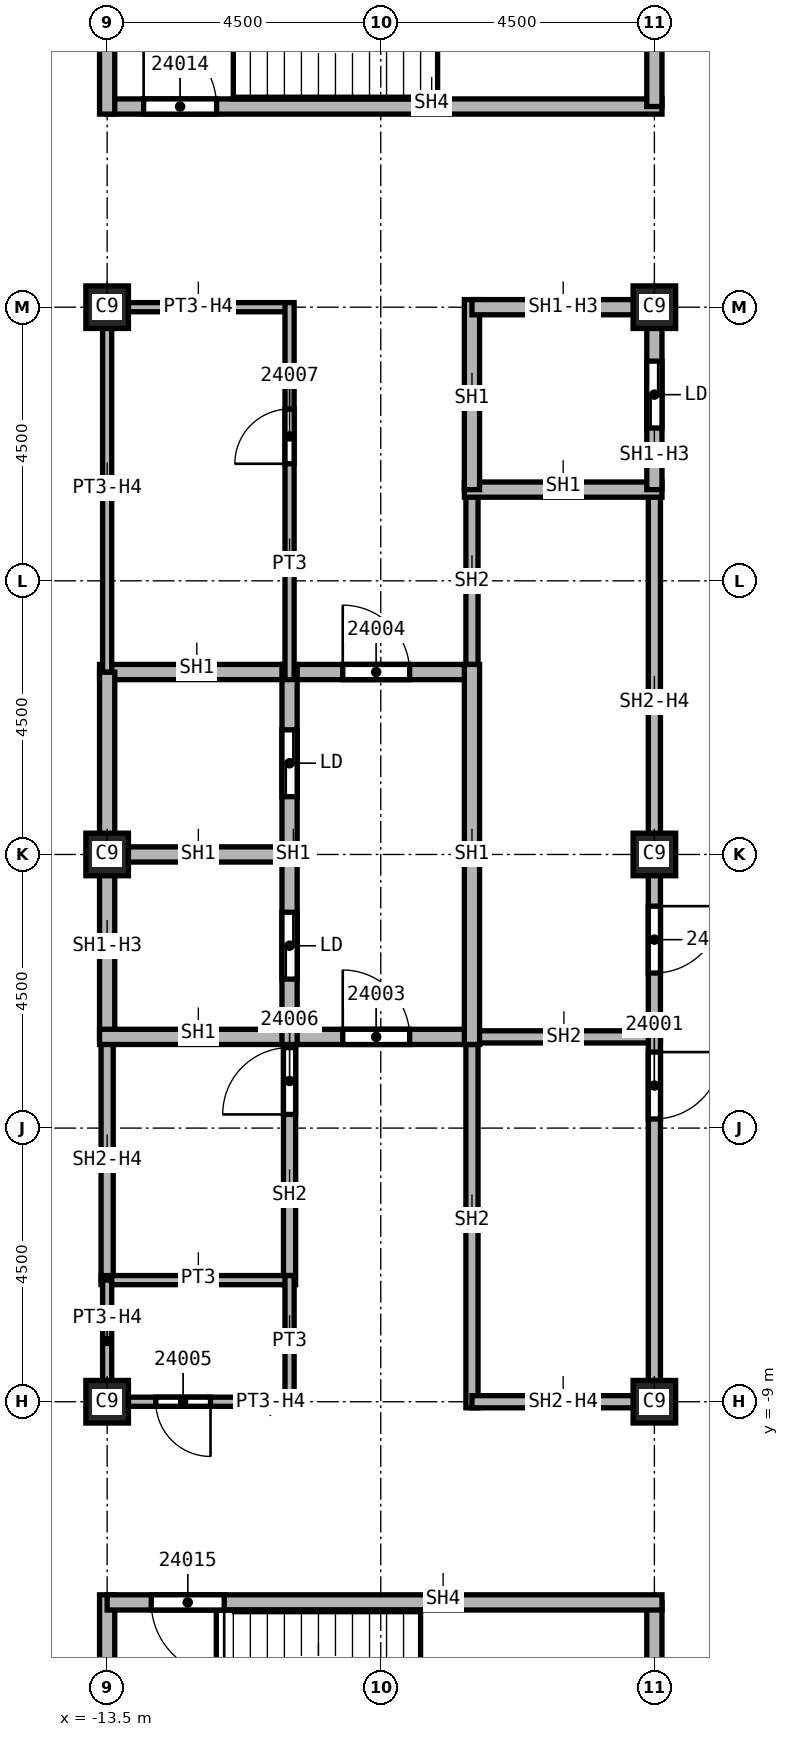
"""IFC4 building model, lengths in metres.
Left out: names, types, materials, properties, quantities, classifications, styles, units other than length and angle.
Written with IfcOpenShell. Run it as: python <this file> out.ifc"""

import sys

from ifc_helpers import new_model, si_unit, direction, frame, frame_2d, origin, origin_2d, place, context, subcontext, project, spatial, rectangle, extrude, element, fill, save


model = new_model("IFC4")
c1 = context("Model", 3, precision=1e-05, world=origin(), true_north=direction((0.0, 1.0)))
c2 = subcontext(c1, "Body", "Model", "MODEL_VIEW")
j1 = project(units=[si_unit("LENGTHUNIT", "METRE"), si_unit("PLANEANGLEUNIT", "RADIAN")], contexts=[c1])
p1 = place(None, origin())
s1 = spatial("IfcSite", under=j1, at=p1, CompositionType="ELEMENT")
p2 = place(p1, origin())
s2 = spatial("IfcBuilding", under=s1, at=p2, CompositionType="ELEMENT")
p3 = place(p2, frame((0.0, 0.0, 338.0)))
s3 = spatial("IfcBuildingStorey", under=s2, at=p3, CompositionType="ELEMENT", Elevation=338.0)
for number, where, z_axis, x_axis in (
    (1, (-4.5, 0.0, 0.0), (0.0, 0.0, 1.0), (1.0, 0.0, 0.0)),
    (2, (-4.5, 9.0, 0.0), (0.0, 0.0, 1.0), (1.0, 0.0, 0.0)),
    (3, (-4.5, -9.0, 0.0), (0.0, 0.0, 1.0), (1.0, 0.0, 0.0)),
    (4, (-13.5, 0.0, 0.0), (0.0, 0.0, 1.0), (1.0, 0.0, 0.0)),
    (5, (-13.5, 9.0, 0.0), (0.0, 0.0, 1.0), (1.0, 0.0, 0.0)),
    (6, (-13.5, -9.0, 0.0), (0.0, 0.0, 1.0), (1.0, 0.0, 0.0)),
):
    element("IfcColumn", number, at=place(p3, frame(where, z_axis=z_axis, x_axis=x_axis)), inside=s3, PredefinedType="COLUMN", context=c2, shape_type="SweptSolid", body=[
        extrude(rectangle(XDim=0.7, YDim=0.7, at=origin_2d()), origin(), (0.0, 0.0, 1.0), 3.74),
    ])
p4 = place(p3, frame((-13.5, -7.0, 0.0), z_axis=(0.0, 0.0, 1.0), x_axis=(0.0, 1.0, 0.0)))
e7 = element("IfcWall", 7, at=p4, inside=s3, PredefinedType="SOLIDWALL", context=c2, shape_type="SweptSolid", body=[
    extrude(rectangle(XDim=4.0, YDim=0.2, at=frame_2d((2.0, 0.0))), origin(), (0.0, 0.0, 1.0), 3.062),
])
p5 = place(p3, frame((-10.5, -7.075, 0.0), z_axis=(0.0, 0.0, 1.0), x_axis=(0.0, 1.0, 0.0)))
e8 = element("IfcWall", 8, at=p5, inside=s3, PredefinedType="SOLIDWALL", context=c2, shape_type="SweptSolid", body=[
    extrude(rectangle(XDim=4.2, YDim=0.2, at=frame_2d((2.1, 0.0))), origin(), (0.0, 0.0, 1.0), 3.74),
])
p6 = place(p5, frame((2.8, 0.0, 0.0)))
e9 = element("IfcOpeningElement", 9, at=p6, cuts=e8, PredefinedType="OPENING", context=c2, shape_type="SweptSolid", body=[
    extrude(rectangle(XDim=1.1, YDim=2.1, at=frame_2d((0.55, 1.05))), frame((0.0, 0.1, 0.0), z_axis=(0.0, -1.0, 0.0), x_axis=(1.0, 0.0, 0.0)), (0.0, 0.0, 1.0), 0.2),
])
p7 = place(p3, frame((-7.625, -3.0, 0.0), z_axis=(0.0, 0.0, 1.0), x_axis=(1.0, 0.0, 0.0)))
e10 = element("IfcWall", 10, at=p7, inside=s3, PredefinedType="SOLIDWALL", context=c2, shape_type="SweptSolid", body=[
    extrude(rectangle(XDim=3.225, YDim=0.2, at=frame_2d((1.613, 0.0))), origin(), (0.0, 0.0, 1.0), 3.74),
])
p8 = place(p3, frame((-7.5, -9.1, 0.0), z_axis=(0.0, 0.0, 1.0), x_axis=(0.0, 1.0, 0.0)))
e11 = element("IfcWall", 11, at=p8, inside=s3, PredefinedType="SOLIDWALL", context=c2, shape_type="SweptSolid", body=[
    extrude(rectangle(XDim=6.225, YDim=0.2, at=frame_2d((3.113, 0.0))), origin(), (0.0, 0.0, 1.0), 3.74),
])
p9 = place(p3, frame((-7.5, 2.875, 0.0), z_axis=(0.0, 0.0, 1.0), x_axis=(0.0, 1.0, 0.0)))
e12 = element("IfcWall", 12, at=p9, inside=s3, PredefinedType="SOLIDWALL", context=c2, shape_type="SweptSolid", body=[
    extrude(rectangle(XDim=3.125, YDim=0.2, at=frame_2d((1.562, 0.0))), origin(), (0.0, 0.0, 1.0), 3.74),
])
p10 = place(p3, frame((-4.5, -9.0, 0.0), z_axis=(0.0, 0.0, 1.0), x_axis=(-1.0, 0.0, 0.0)))
e13 = element("IfcWall", 13, at=p10, inside=s3, PredefinedType="SOLIDWALL", context=c2, shape_type="SweptSolid", body=[
    extrude(rectangle(XDim=3.0, YDim=0.2, at=frame_2d((1.5, 0.0))), origin(), (0.0, 0.0, 1.0), 3.062),
])
p11 = place(p3, frame((-4.5, 6.0, 0.0), z_axis=(0.0, 0.0, 1.0), x_axis=(0.0, -1.0, 0.0)))
e14 = element("IfcWall", 14, at=p11, inside=s3, PredefinedType="SOLIDWALL", context=c2, shape_type="SweptSolid", body=[
    extrude(rectangle(XDim=15.1, YDim=0.2, at=frame_2d((7.55, 0.0))), origin(), (0.0, 0.0, 1.0), 3.062),
])
p12 = place(p11, frame((9.25, 0.0, 0.0)))
e15 = element("IfcOpeningElement", 15, at=p12, cuts=e14, PredefinedType="OPENING", context=c2, shape_type="SweptSolid", body=[
    extrude(rectangle(XDim=1.1, YDim=2.1, at=frame_2d((0.55, 1.05))), frame((0.0, 0.1, 0.0), z_axis=(0.0, -1.0, 0.0), x_axis=(1.0, 0.0, 0.0)), (0.0, 0.0, 1.0), 0.2),
])
p13 = place(p11, frame((6.85, 0.0, 0.0)))
e16 = element("IfcOpeningElement", 16, at=p13, cuts=e14, PredefinedType="OPENING", context=c2, shape_type="SweptSolid", body=[
    extrude(rectangle(XDim=1.1, YDim=2.1, at=frame_2d((0.55, 1.05))), frame((0.0, 0.1, 0.0), z_axis=(0.0, -1.0, 0.0), x_axis=(1.0, 0.0, 0.0)), (0.0, 0.0, 1.0), 0.2),
])
p14 = place(p3, frame((-13.625, 0.0, 0.0), z_axis=(0.0, 0.0, 1.0), x_axis=(1.0, 0.0, 0.0)))
e17 = element("IfcWall", 17, at=p14, inside=s3, PredefinedType="SOLIDWALL", context=c2, shape_type="SweptSolid", body=[
    extrude(rectangle(XDim=3.125, YDim=0.25, at=frame_2d((1.562, 0.0))), origin(), (0.0, 0.0, 1.0), 3.74),
])
p15 = place(p3, frame((-13.625, 3.0, 0.0), z_axis=(0.0, 0.0, 1.0), x_axis=(1.0, 0.0, 0.0)))
e18 = element("IfcWall", 18, at=p15, inside=s3, PredefinedType="SOLIDWALL", context=c2, shape_type="SweptSolid", body=[
    extrude(rectangle(XDim=6.125, YDim=0.25, at=frame_2d((3.062, 0.0))), origin(), (0.0, 0.0, 1.0), 3.74),
])
p16 = place(p15, frame((4.0, 0.0, 0.0)))
e19 = element("IfcOpeningElement", 19, at=p16, cuts=e18, PredefinedType="OPENING", context=c2, shape_type="SweptSolid", body=[
    extrude(rectangle(XDim=1.1, YDim=2.1, at=frame_2d((0.55, 1.05))), frame((0.0, 0.125, 0.0), z_axis=(0.0, -1.0, 0.0), x_axis=(1.0, 0.0, 0.0)), (0.0, 0.0, 1.0), 0.25),
])
p17 = place(p3, frame((-13.5, -3.0, 0.0), z_axis=(0.0, 0.0, 1.0), x_axis=(0.0, 1.0, 0.0)))
e20 = element("IfcWall", 20, at=p17, inside=s3, PredefinedType="SOLIDWALL", context=c2, shape_type="SweptSolid", body=[
    extrude(rectangle(XDim=6.0, YDim=0.25, at=frame_2d((3.0, 0.0))), origin(), (0.0, 0.0, 1.0), 3.062),
])
p18 = place(p3, frame((-13.625, -3.0, 0.0), z_axis=(0.0, 0.0, 1.0), x_axis=(1.0, 0.0, 0.0)))
e21 = element("IfcWall", 21, at=p18, inside=s3, PredefinedType="SOLIDWALL", context=c2, shape_type="SweptSolid", body=[
    extrude(rectangle(XDim=6.125, YDim=0.25, at=frame_2d((3.062, 0.0))), origin(), (0.0, 0.0, 1.0), 3.74),
])
p19 = place(p18, frame((4.0, 0.0, 0.0)))
e22 = element("IfcOpeningElement", 22, at=p19, cuts=e21, PredefinedType="OPENING", context=c2, shape_type="SweptSolid", body=[
    extrude(rectangle(XDim=1.1, YDim=2.1, at=frame_2d((0.55, 1.05))), frame((0.0, 0.125, 0.0), z_axis=(0.0, -1.0, 0.0), x_axis=(1.0, 0.0, 0.0)), (0.0, 0.0, 1.0), 0.25),
])
p20 = place(p3, frame((-10.5, -3.125, 0.0), z_axis=(0.0, 0.0, 1.0), x_axis=(0.0, 1.0, 0.0)))
e23 = element("IfcWall", 23, at=p20, inside=s3, PredefinedType="SOLIDWALL", context=c2, shape_type="SweptSolid", body=[
    extrude(rectangle(XDim=6.25, YDim=0.25, at=frame_2d((3.125, 0.0))), origin(), (0.0, 0.0, 1.0), 3.74),
])
p21 = place(p20, frame((1.075, 0.0, 0.0)))
e24 = element("IfcOpeningElement", 24, at=p21, cuts=e23, PredefinedType="OPENING", context=c2, shape_type="SweptSolid", body=[
    extrude(rectangle(XDim=1.1, YDim=2.1, at=frame_2d((0.55, 1.05))), frame((0.0, 0.125, 0.0), z_axis=(0.0, -1.0, 0.0), x_axis=(1.0, 0.0, 0.0)), (0.0, 0.0, 1.0), 0.25),
])
p22 = place(p20, frame((4.075, 0.0, 0.0)))
e25 = element("IfcOpeningElement", 25, at=p22, cuts=e23, PredefinedType="OPENING", context=c2, shape_type="SweptSolid", body=[
    extrude(rectangle(XDim=1.1, YDim=2.1, at=frame_2d((0.55, 1.05))), frame((0.0, 0.125, 0.0), z_axis=(0.0, -1.0, 0.0), x_axis=(1.0, 0.0, 0.0)), (0.0, 0.0, 1.0), 0.25),
])
p23 = place(p3, frame((-7.625, 6.0, 0.0), z_axis=(0.0, 0.0, 1.0), x_axis=(1.0, 0.0, 0.0)))
e26 = element("IfcWall", 26, at=p23, inside=s3, PredefinedType="SOLIDWALL", context=c2, shape_type="SweptSolid", body=[
    extrude(rectangle(XDim=3.25, YDim=0.25, at=frame_2d((1.625, 0.0))), origin(), (0.0, 0.0, 1.0), 3.74),
])
p24 = place(p3, frame((-7.5, -3.125, 0.0), z_axis=(0.0, 0.0, 1.0), x_axis=(0.0, 1.0, 0.0)))
e27 = element("IfcWall", 27, at=p24, inside=s3, PredefinedType="SOLIDWALL", context=c2, shape_type="SweptSolid", body=[
    extrude(rectangle(XDim=6.25, YDim=0.25, at=frame_2d((3.125, 0.0))), origin(), (0.0, 0.0, 1.0), 3.74),
])
p25 = place(p3, frame((-7.5, 6.0, 0.0), z_axis=(0.0, 0.0, 1.0), x_axis=(0.0, 1.0, 0.0)))
e28 = element("IfcWall", 28, at=p25, inside=s3, PredefinedType="SOLIDWALL", context=c2, shape_type="SweptSolid", body=[
    extrude(rectangle(XDim=3.125, YDim=0.25, at=frame_2d((1.562, 0.0))), origin(), (0.0, 0.0, 1.0), 3.74),
])
p26 = place(p3, frame((-7.5, 9.0, 0.0), z_axis=(0.0, 0.0, 1.0), x_axis=(1.0, 0.0, 0.0)))
e29 = element("IfcWall", 29, at=p26, inside=s3, PredefinedType="SOLIDWALL", context=c2, shape_type="SweptSolid", body=[
    extrude(rectangle(XDim=3.0, YDim=0.25, at=frame_2d((1.5, 0.0))), origin(), (0.0, 0.0, 1.0), 3.062),
])
p27 = place(p3, frame((-4.5, 9.125, 0.0), z_axis=(0.0, 0.0, 1.0), x_axis=(0.0, -1.0, 0.0)))
e30 = element("IfcWall", 30, at=p27, inside=s3, PredefinedType="SOLIDWALL", context=c2, shape_type="SweptSolid", body=[
    extrude(rectangle(XDim=3.125, YDim=0.25, at=frame_2d((1.562, 0.0))), origin(), (0.0, 0.0, 1.0), 3.062),
])
p28 = place(p27, frame((1.012, 0.0, 0.0)))
e31 = element("IfcOpeningElement", 31, at=p28, cuts=e30, PredefinedType="OPENING", context=c2, shape_type="SweptSolid", body=[
    extrude(rectangle(XDim=1.1, YDim=2.1, at=frame_2d((0.55, 1.05))), frame((0.0, 0.125, 0.0), z_axis=(0.0, -1.0, 0.0), x_axis=(1.0, 0.0, 0.0)), (0.0, 0.0, 1.0), 0.25),
])
p29 = place(p3, frame((-13.5, -12.175, 0.0), z_axis=(0.0, 0.0, 1.0), x_axis=(0.0, -1.0, 0.0)))
e32 = element("IfcWall", 32, at=p29, inside=s3, PredefinedType="SOLIDWALL", context=c2, shape_type="SweptSolid", body=[
    extrude(rectangle(XDim=4.75, YDim=0.25, at=frame_2d((2.375, 0.0))), origin(), (0.0, 0.0, 1.0), 3.74),
])
p30 = place(p3, frame((-13.5, 12.3, 0.0), z_axis=(0.0, 0.0, 1.0), x_axis=(1.0, 0.0, 0.0)))
e33 = element("IfcWall", 33, at=p30, inside=s3, PredefinedType="SOLIDWALL", context=c2, shape_type="SweptSolid", body=[
    extrude(rectangle(XDim=9.125, YDim=0.25, at=frame_2d((4.562, 0.0))), origin(), (0.0, 0.0, 1.0), 3.74),
])
p31 = place(p30, frame((0.6, 0.0, 0.0)))
e34 = element("IfcOpeningElement", 34, at=p31, cuts=e33, PredefinedType="OPENING", context=c2, shape_type="SweptSolid", body=[
    extrude(rectangle(XDim=1.2, YDim=2.1, at=frame_2d((0.6, 1.05))), frame((0.0, 0.125, 0.0), z_axis=(0.0, -1.0, 0.0), x_axis=(1.0, 0.0, 0.0)), (0.0, 0.0, 1.0), 0.25),
])
p32 = place(p3, frame((-13.5, 12.175, 0.0), z_axis=(0.0, 0.0, 1.0), x_axis=(0.0, 1.0, 0.0)))
e35 = element("IfcWall", 35, at=p32, inside=s3, PredefinedType="SOLIDWALL", context=c2, shape_type="SweptSolid", body=[
    extrude(rectangle(XDim=4.75, YDim=0.25, at=frame_2d((2.375, 0.0))), origin(), (0.0, 0.0, 1.0), 3.74),
])
p33 = place(p3, frame((-4.5, -12.3, 0.0), z_axis=(0.0, 0.0, 1.0), x_axis=(0.0, -1.0, 0.0)))
e36 = element("IfcWall", 36, at=p33, inside=s3, PredefinedType="SOLIDWALL", context=c2, shape_type="SweptSolid", body=[
    extrude(rectangle(XDim=4.625, YDim=0.25, at=frame_2d((2.312, 0.0))), origin(), (0.0, 0.0, 1.0), 3.74),
])
p34 = place(p3, frame((-4.5, 16.8, 0.0), z_axis=(0.0, 0.0, 1.0), x_axis=(0.0, -1.0, 0.0)))
e37 = element("IfcWall", 37, at=p34, inside=s3, PredefinedType="SOLIDWALL", context=c2, shape_type="SweptSolid", body=[
    extrude(rectangle(XDim=4.5, YDim=0.25, at=frame_2d((2.25, 0.0))), origin(), (0.0, 0.0, 1.0), 3.74),
])
p35 = place(p3, frame((-4.375, -12.3, 0.0), z_axis=(0.0, 0.0, 1.0), x_axis=(-1.0, 0.0, 0.0)))
e38 = element("IfcWall", 38, at=p35, inside=s3, PredefinedType="SOLIDWALL", context=c2, shape_type="SweptSolid", body=[
    extrude(rectangle(XDim=9.125, YDim=0.25, at=frame_2d((4.562, 0.0))), origin(), (0.0, 0.0, 1.0), 3.74),
])
p36 = place(p35, frame((7.2, 0.0, 0.0)))
e39 = element("IfcOpeningElement", 39, at=p36, cuts=e38, PredefinedType="OPENING", context=c2, shape_type="SweptSolid", body=[
    extrude(rectangle(XDim=1.2, YDim=2.1, at=frame_2d((0.6, 1.05))), frame((0.0, 0.125, 0.0), z_axis=(0.0, -1.0, 0.0), x_axis=(1.0, 0.0, 0.0)), (0.0, 0.0, 1.0), 0.25),
])
p37 = place(p3, frame((-13.6, -7.0, 0.0), z_axis=(0.0, 0.0, 1.0), x_axis=(1.0, 0.0, 0.0)))
e40 = element("IfcWall", 40, at=p37, inside=s3, PredefinedType="PARTITIONING", context=c2, shape_type="SweptSolid", body=[
    extrude(rectangle(XDim=3.1, YDim=0.15, at=frame_2d((1.55, 0.0))), origin(), (0.0, 0.0, 1.0), 3.74),
])
p38 = place(p3, frame((-13.5, -9.075, 0.0), z_axis=(0.0, 0.0, 1.0), x_axis=(0.0, 1.0, 0.0)))
e41 = element("IfcWall", 41, at=p38, inside=s3, PredefinedType="PARTITIONING", context=c2, shape_type="SweptSolid", body=[
    extrude(rectangle(XDim=2.075, YDim=0.15, at=frame_2d((1.038, 0.0))), origin(), (0.0, 0.0, 1.0), 3.062),
])
p39 = place(p3, frame((-13.5, 3.0, 0.0), z_axis=(0.0, 0.0, 1.0), x_axis=(0.0, 1.0, 0.0)))
e42 = element("IfcWall", 42, at=p39, inside=s3, PredefinedType="PARTITIONING", context=c2, shape_type="SweptSolid", body=[
    extrude(rectangle(XDim=6.075, YDim=0.15, at=frame_2d((3.038, 0.0))), origin(), (0.0, 0.0, 1.0), 3.062),
])
p40 = place(p3, frame((-13.5, 9.0, 0.0), z_axis=(0.0, 0.0, 1.0), x_axis=(1.0, 0.0, 0.0)))
e43 = element("IfcWall", 43, at=p40, inside=s3, PredefinedType="PARTITIONING", context=c2, shape_type="SweptSolid", body=[
    extrude(rectangle(XDim=3.0, YDim=0.15, at=frame_2d((1.5, 0.0))), origin(), (0.0, 0.0, 1.0), 3.062),
])
p41 = place(p3, frame((-10.5, -9.075, 0.0), z_axis=(0.0, 0.0, 1.0), x_axis=(0.0, 1.0, 0.0)))
e44 = element("IfcWall", 44, at=p41, inside=s3, PredefinedType="PARTITIONING", context=c2, shape_type="SweptSolid", body=[
    extrude(rectangle(XDim=2.15, YDim=0.15, at=frame_2d((1.075, 0.0))), origin(), (0.0, 0.0, 1.0), 3.74),
])
p42 = place(p3, frame((-10.5, -9.0, 0.0), z_axis=(0.0, 0.0, 1.0), x_axis=(-1.0, 0.0, 0.0)))
e45 = element("IfcWall", 45, at=p42, inside=s3, PredefinedType="PARTITIONING", context=c2, shape_type="SweptSolid", body=[
    extrude(rectangle(XDim=3.0, YDim=0.15, at=frame_2d((1.5, 0.0))), origin(), (0.0, 0.0, 1.0), 3.062),
])
p43 = place(p42, frame((1.3, 0.0, 0.0)))
e46 = element("IfcOpeningElement", 46, at=p43, cuts=e45, PredefinedType="OPENING", context=c2, shape_type="SweptSolid", body=[
    extrude(rectangle(XDim=0.9, YDim=2.1, at=frame_2d((0.45, 1.05))), frame((0.0, 0.075, 0.0), z_axis=(0.0, -1.0, 0.0), x_axis=(1.0, 0.0, 0.0)), (0.0, 0.0, 1.0), 0.15),
])
p44 = place(p3, frame((-10.5, 2.875, 0.0), z_axis=(0.0, 0.0, 1.0), x_axis=(0.0, 1.0, 0.0)))
e47 = element("IfcWall", 47, at=p44, inside=s3, PredefinedType="PARTITIONING", context=c2, shape_type="SweptSolid", body=[
    extrude(rectangle(XDim=6.2, YDim=0.15, at=frame_2d((3.1, 0.0))), origin(), (0.0, 0.0, 1.0), 3.74),
])
p45 = place(p44, frame((3.55, 0.0, 0.0)))
e48 = element("IfcOpeningElement", 48, at=p45, cuts=e47, PredefinedType="OPENING", context=c2, shape_type="SweptSolid", body=[
    extrude(rectangle(XDim=0.9, YDim=2.1, at=frame_2d((0.45, 1.05))), frame((0.0, 0.075, 0.0), z_axis=(0.0, -1.0, 0.0), x_axis=(1.0, 0.0, 0.0)), (0.0, 0.0, 1.0), 0.15),
])
p46 = place(p12, origin())
e49 = element("IfcDoor", 49, at=p46, inside=s3, OperationType="SINGLE_SWING_RIGHT", PredefinedType="DOOR", context=c2, shape_type="SweptSolid", body=[
    extrude(rectangle(XDim=1.1, YDim=2.1, at=frame_2d((0.55, 1.05))), frame((0.0, 0.025, 0.0), z_axis=(0.0, -1.0, 0.0), x_axis=(1.0, 0.0, 0.0)), (0.0, 0.0, 1.0), 0.05),
])
fill(e15, e49)
p47 = place(p13, origin())
e50 = element("IfcDoor", 50, at=p47, inside=s3, OperationType="SINGLE_SWING_LEFT", PredefinedType="DOOR", context=c2, shape_type="SweptSolid", body=[
    extrude(rectangle(XDim=1.1, YDim=2.1, at=frame_2d((0.55, 1.05))), frame((0.0, 0.025, 0.0), z_axis=(0.0, -1.0, 0.0), x_axis=(1.0, 0.0, 0.0)), (0.0, 0.0, 1.0), 0.05),
])
fill(e16, e50)
p48 = place(p19, origin())
e51 = element("IfcDoor", 51, at=p48, inside=s3, OperationType="SINGLE_SWING_RIGHT", PredefinedType="DOOR", context=c2, shape_type="SweptSolid", body=[
    extrude(rectangle(XDim=1.1, YDim=2.1, at=frame_2d((0.55, 1.05))), frame((0.0, 0.025, 0.0), z_axis=(0.0, -1.0, 0.0), x_axis=(1.0, 0.0, 0.0)), (0.0, 0.0, 1.0), 0.05),
])
fill(e22, e51)
p49 = place(p16, origin())
e52 = element("IfcDoor", 52, at=p49, inside=s3, OperationType="SINGLE_SWING_LEFT", PredefinedType="DOOR", context=c2, shape_type="SweptSolid", body=[
    extrude(rectangle(XDim=1.1, YDim=2.1, at=frame_2d((0.55, 1.05))), frame((0.0, 0.025, 0.0), z_axis=(0.0, -1.0, 0.0), x_axis=(1.0, 0.0, 0.0)), (0.0, 0.0, 1.0), 0.05),
])
fill(e19, e52)
p50 = place(p43, origin())
e53 = element("IfcDoor", 53, at=p50, inside=s3, OperationType="SINGLE_SWING_RIGHT", PredefinedType="DOOR", context=c2, shape_type="SweptSolid", body=[
    extrude(rectangle(XDim=0.9, YDim=2.1, at=frame_2d((0.45, 1.05))), frame((0.0, 0.025, 0.0), z_axis=(0.0, -1.0, 0.0), x_axis=(1.0, 0.0, 0.0)), (0.0, 0.0, 1.0), 0.05),
])
fill(e46, e53)
p51 = place(p6, origin())
e54 = element("IfcDoor", 54, at=p51, inside=s3, OperationType="SINGLE_SWING_LEFT", PredefinedType="DOOR", context=c2, shape_type="SweptSolid", body=[
    extrude(rectangle(XDim=1.1, YDim=2.1, at=frame_2d((0.55, 1.05))), frame((0.0, 0.025, 0.0), z_axis=(0.0, -1.0, 0.0), x_axis=(1.0, 0.0, 0.0)), (0.0, 0.0, 1.0), 0.05),
])
fill(e9, e54)
p52 = place(p45, origin())
e55 = element("IfcDoor", 55, at=p52, inside=s3, OperationType="SINGLE_SWING_RIGHT", PredefinedType="DOOR", context=c2, shape_type="SweptSolid", body=[
    extrude(rectangle(XDim=0.9, YDim=2.1, at=frame_2d((0.45, 1.05))), frame((0.0, 0.025, 0.0), z_axis=(0.0, -1.0, 0.0), x_axis=(1.0, 0.0, 0.0)), (0.0, 0.0, 1.0), 0.05),
])
fill(e48, e55)
p53 = place(p31, origin())
e56 = element("IfcDoor", 56, at=p53, inside=s3, OperationType="SINGLE_SWING_LEFT", PredefinedType="DOOR", context=c2, shape_type="SweptSolid", body=[
    extrude(rectangle(XDim=1.2, YDim=2.1, at=frame_2d((0.6, 1.05))), frame((0.0, 0.025, 0.0), z_axis=(0.0, -1.0, 0.0), x_axis=(1.0, 0.0, 0.0)), (0.0, 0.0, 1.0), 0.05),
])
fill(e34, e56)
p54 = place(p36, origin())
e57 = element("IfcDoor", 57, at=p54, inside=s3, OperationType="SINGLE_SWING_RIGHT", PredefinedType="DOOR", context=c2, shape_type="SweptSolid", body=[
    extrude(rectangle(XDim=1.2, YDim=2.1, at=frame_2d((0.6, 1.05))), frame((0.0, 0.025, 0.0), z_axis=(0.0, -1.0, 0.0), x_axis=(1.0, 0.0, 0.0)), (0.0, 0.0, 1.0), 0.05),
])
fill(e39, e57)
p55 = place(p28, origin())
e58 = element("IfcDoor", 58, at=p55, inside=s3, OperationType="SLIDING_TO_LEFT", PredefinedType="DOOR", context=c2, shape_type="SweptSolid", body=[
    extrude(rectangle(XDim=1.1, YDim=2.1, at=frame_2d((0.55, 1.05))), frame((0.0, 0.025, 0.0), z_axis=(0.0, -1.0, 0.0), x_axis=(1.0, 0.0, 0.0)), (0.0, 0.0, 1.0), 0.05),
])
fill(e31, e58)
p56 = place(p21, origin())
e59 = element("IfcDoor", 59, at=p56, inside=s3, OperationType="SLIDING_TO_LEFT", PredefinedType="DOOR", context=c2, shape_type="SweptSolid", body=[
    extrude(rectangle(XDim=1.1, YDim=2.1, at=frame_2d((0.55, 1.05))), frame((0.0, 0.025, 0.0), z_axis=(0.0, -1.0, 0.0), x_axis=(1.0, 0.0, 0.0)), (0.0, 0.0, 1.0), 0.05),
])
fill(e24, e59)
p57 = place(p22, origin())
e60 = element("IfcDoor", 60, at=p57, inside=s3, OperationType="SLIDING_TO_LEFT", PredefinedType="DOOR", context=c2, shape_type="SweptSolid", body=[
    extrude(rectangle(XDim=1.1, YDim=2.1, at=frame_2d((0.55, 1.05))), frame((0.0, 0.025, 0.0), z_axis=(0.0, -1.0, 0.0), x_axis=(1.0, 0.0, 0.0)), (0.0, 0.0, 1.0), 0.05),
])
fill(e25, e60)
save(model, sys.argv[1])
